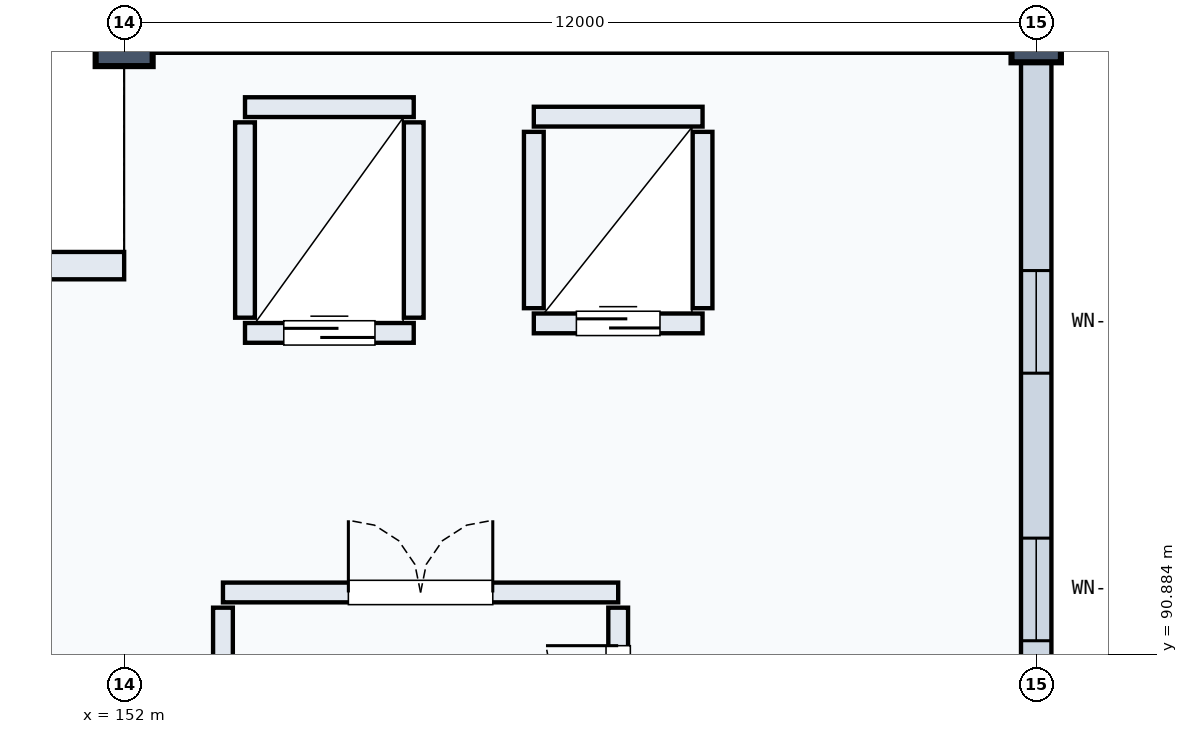
"""IFC4 building model, lengths in metres.
Left out: names, types, materials, properties, quantities, classifications, styles, units other than length and angle.
Written with IfcOpenShell. Run it as: python <this file> out.ifc"""

import sys

from ifc_helpers import new_model, si_unit, direction, frame, frame_2d, origin, origin_2d, place, context, subcontext, project, spatial, rectangle, circle, extrude, element, fill, save


model = new_model("IFC4")
c1 = context("Model", 3, precision=1e-05, world=origin(), true_north=direction((0.0, 1.0)))
c2 = subcontext(c1, "Body", "Model", "MODEL_VIEW")
j1 = project(units=[si_unit("LENGTHUNIT", "METRE"), si_unit("PLANEANGLEUNIT", "RADIAN")], contexts=[c1])
p1 = place(None, origin())
s1 = spatial("IfcSite", under=j1, at=p1, CompositionType="ELEMENT")
p2 = place(p1, origin())
s2 = spatial("IfcBuilding", under=s1, at=p2, CompositionType="ELEMENT")
p3 = place(p2, frame((0.0, 0.0, 24.3)))
s3 = spatial("IfcBuildingStorey", under=s2, at=p3, CompositionType="ELEMENT", Elevation=24.3)
p4 = place(p3, frame((152.0, 99.0, 0.0), z_axis=(0.0, 0.0, 1.0), x_axis=(1.0, 0.0, 0.0)))
e1 = element("IfcColumn", 1, at=p4, inside=s3, PredefinedType="COLUMN", context=c2, shape_type="SweptSolid", body=[
    extrude(circle(Radius=0.375, at=origin_2d()), origin(), (0.0, 0.0, 1.0), 5.4),
])
p5 = place(p3, frame((164.0, 99.0, 0.0), z_axis=(0.0, 0.0, 1.0), x_axis=(1.0, 0.0, 0.0)))
e2 = element("IfcColumn", 2, at=p5, inside=s3, PredefinedType="COLUMN", context=c2, shape_type="SweptSolid", body=[
    extrude(circle(Radius=0.325, at=origin_2d()), origin(), (0.0, 0.0, 1.0), 5.4),
])
p6 = place(p3, frame((140.0, 96.0, 0.0), z_axis=(0.0, 0.0, 1.0), x_axis=(1.0, 0.0, 0.0)))
e3 = element("IfcWall", 3, at=p6, inside=s3, PredefinedType="SOLIDWALL", context=c2, shape_type="SweptSolid", body=[
    extrude(rectangle(XDim=12.0, YDim=0.36, at=frame_2d((6.0, 0.0))), origin(), (0.0, 0.0, 1.0), 5.185),
])
p7 = place(p6, frame((2.1, 0.0, 0.85)))
e4 = element("IfcOpeningElement", 4, at=p7, cuts=e3, PredefinedType="OPENING", context=c2, shape_type="SweptSolid", body=[
    extrude(rectangle(XDim=1.8, YDim=2.1, at=frame_2d((0.9, 1.05))), frame((0.0, 0.19, 0.0), z_axis=(0.0, -1.0, 0.0), x_axis=(1.0, 0.0, 0.0)), (0.0, 0.0, 1.0), 0.38),
])
p8 = place(p6, frame((5.1, 0.0, 0.85)))
e5 = element("IfcOpeningElement", 5, at=p8, cuts=e3, PredefinedType="OPENING", context=c2, shape_type="SweptSolid", body=[
    extrude(rectangle(XDim=1.8, YDim=2.1, at=frame_2d((0.9, 1.05))), frame((0.0, 0.19, 0.0), z_axis=(0.0, -1.0, 0.0), x_axis=(1.0, 0.0, 0.0)), (0.0, 0.0, 1.0), 0.38),
])
p9 = place(p6, frame((8.1, 0.0, 0.85)))
e6 = element("IfcOpeningElement", 6, at=p9, cuts=e3, PredefinedType="OPENING", context=c2, shape_type="SweptSolid", body=[
    extrude(rectangle(XDim=1.8, YDim=2.1, at=frame_2d((0.9, 1.05))), frame((0.0, 0.19, 0.0), z_axis=(0.0, -1.0, 0.0), x_axis=(1.0, 0.0, 0.0)), (0.0, 0.0, 1.0), 0.38),
])
p10 = place(p3, frame((152.22, 99.0, 0.0), z_axis=(0.0, 0.0, 1.0), x_axis=(1.0, 0.0, 0.0)))
e7 = element("IfcWall", 7, at=p10, inside=s3, PredefinedType="SOLIDWALL", context=c2, shape_type="SweptSolid", body=[
    extrude(rectangle(XDim=11.56, YDim=0.4, at=frame_2d((5.78, 0.0))), origin(), (0.0, 0.0, 1.0), 5.185),
])
p11 = place(p10, frame((3.178, 0.0, 0.8)))
e8 = element("IfcOpeningElement", 8, at=p11, cuts=e7, PredefinedType="OPENING", context=c2, shape_type="SweptSolid", body=[
    extrude(rectangle(XDim=1.35, YDim=2.1, at=frame_2d((0.675, 1.05))), frame((0.0, 0.21, 0.0), z_axis=(0.0, -1.0, 0.0), x_axis=(1.0, 0.0, 0.0)), (0.0, 0.0, 1.0), 0.42),
])
p12 = place(p10, frame((7.032, 0.0, 0.8)))
e9 = element("IfcOpeningElement", 9, at=p12, cuts=e7, PredefinedType="OPENING", context=c2, shape_type="SweptSolid", body=[
    extrude(rectangle(XDim=1.35, YDim=2.1, at=frame_2d((0.675, 1.05))), frame((0.0, 0.21, 0.0), z_axis=(0.0, -1.0, 0.0), x_axis=(1.0, 0.0, 0.0)), (0.0, 0.0, 1.0), 0.42),
])
p13 = place(p3, frame((164.0, 88.22, 0.0), z_axis=(0.0, 0.0, 1.0), x_axis=(0.0, 1.0, 0.0)))
e10 = element("IfcWall", 10, at=p13, inside=s3, PredefinedType="SOLIDWALL", context=c2, shape_type="SweptSolid", body=[
    extrude(rectangle(XDim=10.56, YDim=0.4, at=frame_2d((5.28, 0.0))), origin(), (0.0, 0.0, 1.0), 5.185),
])
p14 = place(p13, frame((2.845, 0.0, 0.8)))
e11 = element("IfcOpeningElement", 11, at=p14, cuts=e10, PredefinedType="OPENING", context=c2, shape_type="SweptSolid", body=[
    extrude(rectangle(XDim=1.35, YDim=2.1, at=frame_2d((0.675, 1.05))), frame((0.0, 0.21, 0.0), z_axis=(0.0, -1.0, 0.0), x_axis=(1.0, 0.0, 0.0)), (0.0, 0.0, 1.0), 0.42),
])
p15 = place(p13, frame((6.365, 0.0, 0.8)))
e12 = element("IfcOpeningElement", 12, at=p15, cuts=e10, PredefinedType="OPENING", context=c2, shape_type="SweptSolid", body=[
    extrude(rectangle(XDim=1.35, YDim=2.1, at=frame_2d((0.675, 1.05))), frame((0.0, 0.21, 0.0), z_axis=(0.0, -1.0, 0.0), x_axis=(1.0, 0.0, 0.0)), (0.0, 0.0, 1.0), 0.42),
])
p16 = place(p3, frame((153.59, 95.115, 0.0), z_axis=(0.0, 0.0, 1.0), x_axis=(1.0, 0.0, 0.0)))
e13 = element("IfcWall", 13, at=p16, inside=s3, PredefinedType="SOLIDWALL", context=c2, shape_type="SweptSolid", body=[
    extrude(rectangle(XDim=2.22, YDim=0.26, at=frame_2d((1.11, 0.0))), origin(), (0.0, 0.0, 1.0), 5.18),
])
p17 = place(p16, frame((0.51, 0.0, 0.0)))
e14 = element("IfcOpeningElement", 14, at=p17, cuts=e13, PredefinedType="OPENING", context=c2, shape_type="SweptSolid", body=[
    extrude(rectangle(XDim=1.2, YDim=2.2, at=frame_2d((0.6, 1.1))), frame((0.0, 0.14, 0.0), z_axis=(0.0, -1.0, 0.0), x_axis=(1.0, 0.0, 0.0)), (0.0, 0.0, 1.0), 0.28),
])
p18 = place(p3, frame((153.59, 98.085, 0.0), z_axis=(0.0, 0.0, 1.0), x_axis=(1.0, 0.0, 0.0)))
e15 = element("IfcWall", 15, at=p18, inside=s3, PredefinedType="SOLIDWALL", context=c2, shape_type="SweptSolid", body=[
    extrude(rectangle(XDim=2.22, YDim=0.26, at=frame_2d((1.11, 0.0))), origin(), (0.0, 0.0, 1.0), 5.18),
])
for number, where, z_axis, x_axis in (
    (16, (153.59, 95.315, 0.0), (0.0, 0.0, 1.0), (0.0, 1.0, 0.0)),
    (17, (155.81, 95.315, 0.0), (0.0, 0.0, 1.0), (0.0, 1.0, 0.0)),
):
    element("IfcWall", number, at=place(p3, frame(where, z_axis=z_axis, x_axis=x_axis)), inside=s3, PredefinedType="SOLIDWALL", context=c2, shape_type="SweptSolid", body=[
        extrude(rectangle(XDim=2.57, YDim=0.26, at=frame_2d((1.285, 0.0))), origin(), (0.0, 0.0, 1.0), 5.18),
    ])
p19 = place(p3, frame((157.39, 95.24, 0.0), z_axis=(0.0, 0.0, 1.0), x_axis=(1.0, 0.0, 0.0)))
e18 = element("IfcWall", 18, at=p19, inside=s3, PredefinedType="SOLIDWALL", context=c2, shape_type="SweptSolid", body=[
    extrude(rectangle(XDim=2.22, YDim=0.26, at=frame_2d((1.11, 0.0))), origin(), (0.0, 0.0, 1.0), 5.18),
])
p20 = place(p19, frame((0.56, 0.0, 0.0)))
e19 = element("IfcOpeningElement", 19, at=p20, cuts=e18, PredefinedType="OPENING", context=c2, shape_type="SweptSolid", body=[
    extrude(rectangle(XDim=1.1, YDim=2.15, at=frame_2d((0.55, 1.075))), frame((0.0, 0.14, 0.0), z_axis=(0.0, -1.0, 0.0), x_axis=(1.0, 0.0, 0.0)), (0.0, 0.0, 1.0), 0.28),
])
p21 = place(p3, frame((157.39, 97.96, 0.0), z_axis=(0.0, 0.0, 1.0), x_axis=(1.0, 0.0, 0.0)))
e20 = element("IfcWall", 20, at=p21, inside=s3, PredefinedType="SOLIDWALL", context=c2, shape_type="SweptSolid", body=[
    extrude(rectangle(XDim=2.22, YDim=0.26, at=frame_2d((1.11, 0.0))), origin(), (0.0, 0.0, 1.0), 5.18),
])
for number, where, z_axis, x_axis in (
    (21, (157.39, 95.44, 0.0), (0.0, 0.0, 1.0), (0.0, 1.0, 0.0)),
    (22, (159.61, 95.44, 0.0), (0.0, 0.0, 1.0), (0.0, 1.0, 0.0)),
):
    element("IfcWall", number, at=place(p3, frame(where, z_axis=z_axis, x_axis=x_axis)), inside=s3, PredefinedType="SOLIDWALL", context=c2, shape_type="SweptSolid", body=[
        extrude(rectangle(XDim=2.32, YDim=0.26, at=frame_2d((1.16, 0.0))), origin(), (0.0, 0.0, 1.0), 5.18),
    ])
p22 = place(p3, frame((153.3, 91.7, 0.0), z_axis=(0.0, 0.0, 1.0), x_axis=(1.0, 0.0, 0.0)))
e23 = element("IfcWall", 23, at=p22, inside=s3, PredefinedType="SOLIDWALL", context=c2, shape_type="SweptSolid", body=[
    extrude(rectangle(XDim=5.2, YDim=0.26, at=frame_2d((2.6, 0.0))), origin(), (0.0, 0.0, 1.0), 5.18),
])
p23 = place(p22, frame((1.65, 0.0, 0.0)))
e24 = element("IfcOpeningElement", 24, at=p23, cuts=e23, PredefinedType="OPENING", context=c2, shape_type="SweptSolid", body=[
    extrude(rectangle(XDim=1.9, YDim=2.2, at=frame_2d((0.95, 1.1))), frame((0.0, 0.14, 0.0), z_axis=(0.0, -1.0, 0.0), x_axis=(1.0, 0.0, 0.0)), (0.0, 0.0, 1.0), 0.28),
])
p24 = place(p3, frame((153.3, 88.6, 0.0), z_axis=(0.0, 0.0, 1.0), x_axis=(0.0, 1.0, 0.0)))
e25 = element("IfcWall", 25, at=p24, inside=s3, PredefinedType="SOLIDWALL", context=c2, shape_type="SweptSolid", body=[
    extrude(rectangle(XDim=2.9, YDim=0.26, at=frame_2d((1.45, 0.0))), origin(), (0.0, 0.0, 1.0), 5.18),
])
p25 = place(p3, frame((158.5, 88.6, 0.0), z_axis=(0.0, 0.0, 1.0), x_axis=(0.0, 1.0, 0.0)))
e26 = element("IfcWall", 26, at=p25, inside=s3, PredefinedType="SOLIDWALL", context=c2, shape_type="SweptSolid", body=[
    extrude(rectangle(XDim=2.9, YDim=0.26, at=frame_2d((1.45, 0.0))), origin(), (0.0, 0.0, 1.0), 5.18),
])
p26 = place(p25, frame((0.5, 0.0, 0.0)))
e27 = element("IfcOpeningElement", 27, at=p26, cuts=e26, PredefinedType="OPENING", context=c2, shape_type="SweptSolid", body=[
    extrude(rectangle(XDim=1.9, YDim=2.2, at=frame_2d((0.95, 1.1))), frame((0.0, 0.14, 0.0), z_axis=(0.0, -1.0, 0.0), x_axis=(1.0, 0.0, 0.0)), (0.0, 0.0, 1.0), 0.28),
])
p27 = place(p14, origin())
e28 = element("IfcWindow", 28, at=p27, inside=s3, PartitioningType="SINGLE_PANEL", PredefinedType="WINDOW", context=c2, shape_type="SweptSolid", body=[
    extrude(rectangle(XDim=1.35, YDim=2.1, at=frame_2d((0.675, 1.05))), frame((0.0, 0.03, 0.0), z_axis=(0.0, -1.0, 0.0), x_axis=(1.0, 0.0, 0.0)), (0.0, 0.0, 1.0), 0.06),
])
fill(e11, e28)
p28 = place(p15, origin())
e29 = element("IfcWindow", 29, at=p28, inside=s3, PartitioningType="SINGLE_PANEL", PredefinedType="WINDOW", context=c2, shape_type="SweptSolid", body=[
    extrude(rectangle(XDim=1.35, YDim=2.1, at=frame_2d((0.675, 1.05))), frame((0.0, 0.03, 0.0), z_axis=(0.0, -1.0, 0.0), x_axis=(1.0, 0.0, 0.0)), (0.0, 0.0, 1.0), 0.06),
])
fill(e12, e29)
p29 = place(p17, origin())
e30 = element("IfcDoor", 30, at=p29, inside=s3, OperationType="SLIDING_TO_LEFT", PredefinedType="DOOR", context=c2, shape_type="SweptSolid", body=[
    extrude(rectangle(XDim=1.2, YDim=2.2, at=frame_2d((0.6, 1.1))), frame((0.0, 0.025, 0.0), z_axis=(0.0, -1.0, 0.0), x_axis=(1.0, 0.0, 0.0)), (0.0, 0.0, 1.0), 0.05),
])
fill(e14, e30)
p30 = place(p20, origin())
e31 = element("IfcDoor", 31, at=p30, inside=s3, OperationType="SLIDING_TO_LEFT", PredefinedType="DOOR", context=c2, shape_type="SweptSolid", body=[
    extrude(rectangle(XDim=1.1, YDim=2.15, at=frame_2d((0.55, 1.075))), frame((0.0, 0.025, 0.0), z_axis=(0.0, -1.0, 0.0), x_axis=(1.0, 0.0, 0.0)), (0.0, 0.0, 1.0), 0.05),
])
fill(e19, e31)
p31 = place(p23, origin())
e32 = element("IfcDoor", 32, at=p31, inside=s3, OperationType="DOUBLE_DOOR_SINGLE_SWING", PredefinedType="DOOR", context=c2, shape_type="SweptSolid", body=[
    extrude(rectangle(XDim=1.9, YDim=2.2, at=frame_2d((0.95, 1.1))), frame((0.0, 0.025, 0.0), z_axis=(0.0, -1.0, 0.0), x_axis=(1.0, 0.0, 0.0)), (0.0, 0.0, 1.0), 0.05),
])
fill(e24, e32)
p32 = place(p26, origin())
e33 = element("IfcDoor", 33, at=p32, inside=s3, OperationType="DOUBLE_DOOR_SINGLE_SWING", PredefinedType="DOOR", context=c2, shape_type="SweptSolid", body=[
    extrude(rectangle(XDim=1.9, YDim=2.2, at=frame_2d((0.95, 1.1))), frame((0.0, 0.025, 0.0), z_axis=(0.0, -1.0, 0.0), x_axis=(1.0, 0.0, 0.0)), (0.0, 0.0, 1.0), 0.05),
])
fill(e27, e33)
save(model, sys.argv[1])
